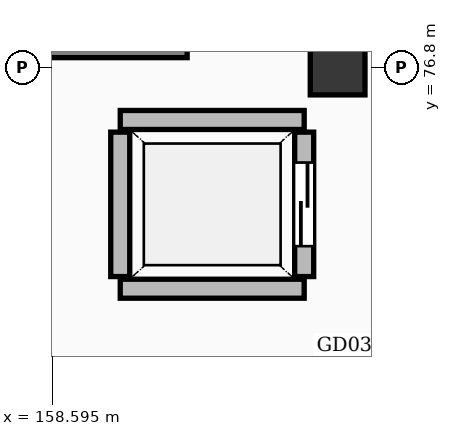
"""IFC4 building model, lengths in metres.
Left out: names, types, materials, properties, quantities, classifications, styles, units other than length and angle.
Written with IfcOpenShell. Run it as: python <this file> out.ifc"""

import sys

from ifc_helpers import new_model, si_unit, direction, frame, frame_2d, origin, origin_2d, place, context, subcontext, project, spatial, rectangle, extrude, element, fill, save


model = new_model("IFC4")
c1 = context("Model", 3, precision=1e-05, world=origin(), true_north=direction((0.0, 1.0)))
c2 = subcontext(c1, "Body", "Model", "MODEL_VIEW")
j1 = project(units=[si_unit("LENGTHUNIT", "METRE"), si_unit("PLANEANGLEUNIT", "RADIAN")], contexts=[c1])
p1 = place(None, origin())
s1 = spatial("IfcSite", under=j1, at=p1, CompositionType="ELEMENT")
p2 = place(p1, origin())
s2 = spatial("IfcBuilding", under=s1, at=p2, CompositionType="ELEMENT")
p3 = place(p2, frame((0.0, 0.0, 31.8)))
s3 = spatial("IfcBuildingStorey", under=s2, at=p3, CompositionType="ELEMENT", Elevation=31.8)
p4 = place(p3, frame((162.35, 76.8, 0.0), z_axis=(0.0, 0.0, 1.0), x_axis=(1.0, 0.0, 0.0)))
e1 = element("IfcColumn", 1, at=p4, inside=s3, PredefinedType="COLUMN", context=c2, shape_type="SweptSolid", body=[
    extrude(rectangle(XDim=0.72, YDim=0.72, at=origin_2d()), origin(), (0.0, 0.0, 1.0), 3.6),
])
p5 = place(p3, frame((156.7, 77.18, 0.0), z_axis=(0.0, 0.0, 1.0), x_axis=(1.0, 0.0, 0.0)))
e2 = element("IfcWall", 2, at=p5, inside=s3, PredefinedType="SHEAR", context=c2, shape_type="SweptSolid", body=[
    extrude(rectangle(XDim=3.67, YDim=0.5, at=frame_2d((1.835, 0.0))), origin(), (0.0, 0.0, 1.0), 3.36),
])
for number, where, z_axis, x_axis in (
    (3, (159.49, 73.89, 0.0), (0.0, 0.0, 1.0), (1.0, 0.0, 0.0)),
    (4, (159.49, 76.11, 0.0), (0.0, 0.0, 1.0), (1.0, 0.0, 0.0)),
):
    element("IfcWall", number, at=place(p3, frame(where, z_axis=z_axis, x_axis=x_axis)), inside=s3, PredefinedType="SOLIDWALL", context=c2, shape_type="SweptSolid", body=[
        extrude(rectangle(XDim=2.42, YDim=0.25, at=frame_2d((1.21, 0.0))), origin(), (0.0, 0.0, 1.0), 3.36),
    ])
p6 = place(p3, frame((159.49, 74.05, 0.0), z_axis=(0.0, 0.0, 1.0), x_axis=(0.0, 1.0, 0.0)))
e5 = element("IfcWall", 5, at=p6, inside=s3, PredefinedType="SOLIDWALL", context=c2, shape_type="SweptSolid", body=[
    extrude(rectangle(XDim=1.9, YDim=0.25, at=frame_2d((0.95, 0.0))), origin(), (0.0, 0.0, 1.0), 3.36),
])
p7 = place(p3, frame((161.91, 74.05, 0.0), z_axis=(0.0, 0.0, 1.0), x_axis=(0.0, 1.0, 0.0)))
e6 = element("IfcWall", 6, at=p7, inside=s3, PredefinedType="SOLIDWALL", context=c2, shape_type="SweptSolid", body=[
    extrude(rectangle(XDim=1.9, YDim=0.25, at=frame_2d((0.95, 0.0))), origin(), (0.0, 0.0, 1.0), 3.36),
])
p8 = place(p7, frame((0.4, 0.0, 0.0)))
e7 = element("IfcOpeningElement", 7, at=p8, cuts=e6, PredefinedType="OPENING", context=c2, shape_type="SweptSolid", body=[
    extrude(rectangle(XDim=1.1, YDim=2.2, at=frame_2d((0.55, 1.1))), frame((0.0, 0.137, 0.0), z_axis=(0.0, -1.0, 0.0), x_axis=(1.0, 0.0, 0.0)), (0.0, 0.0, 1.0), 0.274),
])
p9 = place(p8, origin())
e8 = element("IfcDoor", 8, at=p9, inside=s3, OperationType="SLIDING_TO_LEFT", PredefinedType="DOOR", context=c2, shape_type="SweptSolid", body=[
    extrude(rectangle(XDim=1.1, YDim=2.2, at=frame_2d((0.55, 1.1))), frame((0.0, 0.025, 0.0), z_axis=(0.0, -1.0, 0.0), x_axis=(1.0, 0.0, 0.0)), (0.0, 0.0, 1.0), 0.05),
])
fill(e7, e8)
save(model, sys.argv[1])
